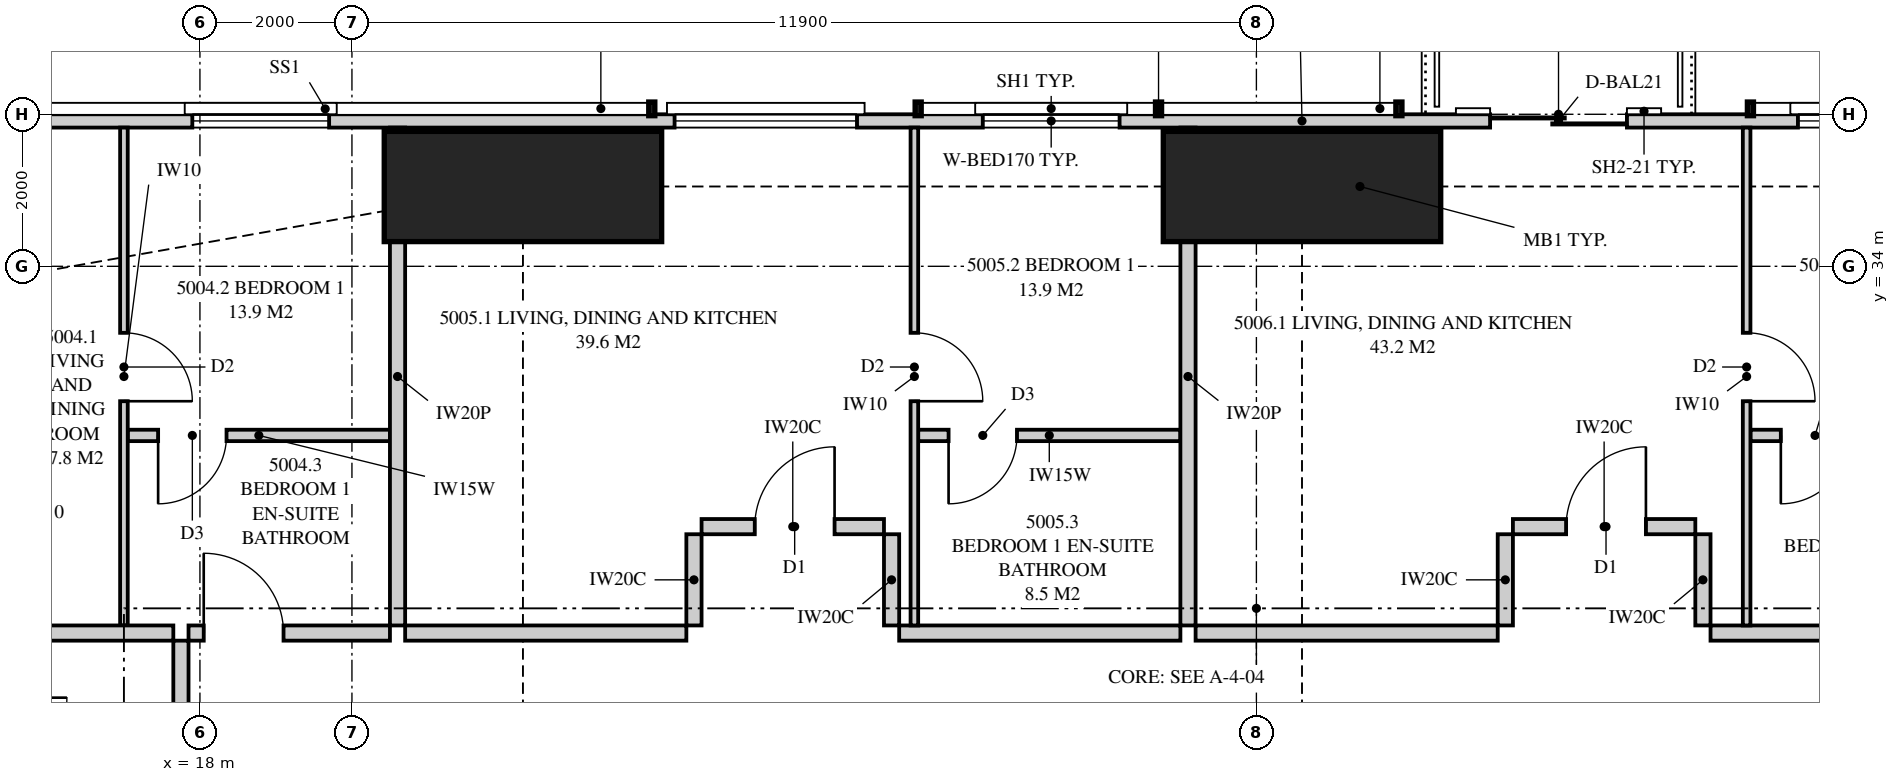
"""IFC4 building model, lengths in metres.
Left out: names, types, materials, properties, quantities, classifications, styles, units other than length and angle.
Written with IfcOpenShell. Run it as: python <this file> out.ifc"""

import sys

from ifc_helpers import new_model, si_unit, direction, frame, frame_2d, origin, origin_2d, place, context, subcontext, project, spatial, polyline, rectangle, outline, extrude, element, fill, save


model = new_model("IFC4")
c1 = context("Model", 3, precision=1e-05, world=origin(), true_north=direction((0.0, 1.0)))
c2 = subcontext(c1, "Body", "Model", "MODEL_VIEW")
j1 = project(units=[si_unit("LENGTHUNIT", "METRE"), si_unit("PLANEANGLEUNIT", "RADIAN")], contexts=[c1])
p1 = place(None, origin())
s1 = spatial("IfcSite", under=j1, at=p1, CompositionType="ELEMENT")
p2 = place(p1, origin())
s2 = spatial("IfcBuilding", under=s1, at=p2, CompositionType="ELEMENT")
p3 = place(p2, frame((0.0, 0.0, 184.5)))
s3 = spatial("IfcBuildingStorey", under=s2, at=p3, CompositionType="ELEMENT", Elevation=184.5)
for number, where, z_axis, x_axis in (
    (1, (32.5, 35.05, 0.0), (0.0, 0.0, 1.0), (0.0, 1.0, 0.0)),
    (2, (22.25, 35.05, 0.0), (0.0, 0.0, 1.0), (0.0, 1.0, 0.0)),
):
    element("IfcColumn", number, at=place(p3, frame(where, z_axis=z_axis, x_axis=x_axis)), inside=s3, PredefinedType="COLUMN", context=c2, shape_type="SweptSolid", body=[
        extrude(rectangle(XDim=1.45, YDim=3.65, at=origin_2d()), origin(), (0.0, 0.0, 1.0), 3.35),
    ])
p4 = place(p3, frame((49.949, 35.913, 0.0), z_axis=(0.0, 0.0, 1.0), x_axis=(-1.0, 0.0, 0.0)))
e3 = element("IfcWall", 3, at=p4, inside=s3, PredefinedType="SOLIDWALL", context=c2, shape_type="SweptSolid", body=[
    extrude(outline(polyline([(0.0, 0.0), (34.897, 0.0), (34.897, 3.11), (27.91, 3.11), (27.91, 2.15), (27.836, 2.15), (27.836, 3.11), (27.699, 3.11), (27.699, 2.15), (7.199, 2.15), (7.199, 3.11), (7.062, 3.11), (7.062, 2.15), (6.987, 2.15), (6.987, 3.11), (0.0, 3.11), (0.0, 0.0)])), frame((0.0, 0.087, 0.0), z_axis=(0.0, -1.0, 0.0), x_axis=(1.0, 0.0, 0.0)), (0.0, 0.0, 1.0), 0.175),
])
p5 = place(p4, frame((2.75, 0.0, 0.4)))
e4 = element("IfcOpeningElement", 4, at=p5, cuts=e3, PredefinedType="OPENING", context=c2, shape_type="SweptSolid", body=[
    extrude(rectangle(XDim=2.4, YDim=1.7, at=frame_2d((1.2, 0.85))), frame((0.0, 0.097, 0.0), z_axis=(0.0, -1.0, 0.0), x_axis=(1.0, 0.0, 0.0)), (0.0, 0.0, 1.0), 0.195),
])
p6 = place(p4, frame((9.124, 0.0, 0.4)))
e5 = element("IfcOpeningElement", 5, at=p6, cuts=e3, PredefinedType="OPENING", context=c2, shape_type="SweptSolid", body=[
    extrude(rectangle(XDim=1.8, YDim=1.7, at=frame_2d((0.9, 0.85))), frame((0.0, 0.097, 0.0), z_axis=(0.0, -1.0, 0.0), x_axis=(1.0, 0.0, 0.0)), (0.0, 0.0, 1.0), 0.195),
])
p7 = place(p4, frame((13.174, 0.0, 0.0)))
e6 = element("IfcOpeningElement", 6, at=p7, cuts=e3, PredefinedType="OPENING", context=c2, shape_type="SweptSolid", body=[
    extrude(rectangle(XDim=1.8, YDim=2.1, at=frame_2d((0.9, 1.05))), frame((0.0, 0.097, 0.0), z_axis=(0.0, -1.0, 0.0), x_axis=(1.0, 0.0, 0.0)), (0.0, 0.0, 1.0), 0.195),
])
p8 = place(p4, frame((19.849, 0.0, 0.4)))
e7 = element("IfcOpeningElement", 7, at=p8, cuts=e3, PredefinedType="OPENING", context=c2, shape_type="SweptSolid", body=[
    extrude(rectangle(XDim=1.8, YDim=1.7, at=frame_2d((0.9, 0.85))), frame((0.0, 0.097, 0.0), z_axis=(0.0, -1.0, 0.0), x_axis=(1.0, 0.0, 0.0)), (0.0, 0.0, 1.0), 0.195),
])
p9 = place(p4, frame((23.304, 0.0, 0.4)))
e8 = element("IfcOpeningElement", 8, at=p9, cuts=e3, PredefinedType="OPENING", context=c2, shape_type="SweptSolid", body=[
    extrude(rectangle(XDim=2.4, YDim=1.7, at=frame_2d((1.2, 0.85))), frame((0.0, 0.097, 0.0), z_axis=(0.0, -1.0, 0.0), x_axis=(1.0, 0.0, 0.0)), (0.0, 0.0, 1.0), 0.195),
])
p10 = place(p4, frame((30.249, 0.0, 0.4)))
e9 = element("IfcOpeningElement", 9, at=p10, cuts=e3, PredefinedType="OPENING", context=c2, shape_type="SweptSolid", body=[
    extrude(rectangle(XDim=1.8, YDim=1.7, at=frame_2d((0.9, 0.85))), frame((0.0, 0.097, 0.0), z_axis=(0.0, -1.0, 0.0), x_axis=(1.0, 0.0, 0.0)), (0.0, 0.0, 1.0), 0.195),
])
p11 = place(p3, frame((20.6, 35.825, 0.0), z_axis=(0.0, 0.0, 1.0), x_axis=(0.0, -1.0, 0.0)))
e10 = element("IfcWall", 10, at=p11, inside=s3, PredefinedType="PARTITIONING", context=c2, shape_type="SweptSolid", body=[
    extrude(outline(polyline([(0.0, 0.0), (6.55, 0.0), (6.55, 3.11), (1.991, 3.11), (1.991, 2.15), (0.143, 2.15), (0.143, 3.11), (0.0, 3.11), (0.0, 0.0)])), frame((0.0, 0.1, 0.0), z_axis=(0.0, -1.0, 0.0), x_axis=(1.0, 0.0, 0.0)), (0.0, 0.0, 1.0), 0.2),
])
p12 = place(p3, frame((17.85, 29.175, 0.0), z_axis=(0.0, 0.0, 1.0), x_axis=(1.0, 0.0, 0.0)))
e11 = element("IfcWall", 11, at=p12, inside=s3, PredefinedType="PARTITIONING", context=c2, shape_type="SweptSolid", body=[
    extrude(rectangle(XDim=2.65, YDim=0.2, at=frame_2d((1.325, 0.0))), origin(), (0.0, 0.0, 1.0), 3.11),
])
p13 = place(p12, frame((0.2, 0.0, 0.0)))
e12 = element("IfcOpeningElement", 12, at=p13, cuts=e11, PredefinedType="OPENING", context=c2, shape_type="SweptSolid", body=[
    extrude(rectangle(XDim=1.05, YDim=2.2, at=frame_2d((0.525, 1.1))), frame((0.0, 0.11, 0.0), z_axis=(0.0, -1.0, 0.0), x_axis=(1.0, 0.0, 0.0)), (0.0, 0.0, 1.0), 0.22),
])
p14 = place(p3, frame((17.0, 35.825, 0.0), z_axis=(0.0, 0.0, 1.0), x_axis=(0.0, -1.0, 0.0)))
e13 = element("IfcWall", 13, at=p14, inside=s3, PredefinedType="PARTITIONING", context=c2, shape_type="SweptSolid", body=[
    extrude(outline(polyline([(0.0, 0.0), (6.55, 0.0), (6.55, 3.11), (2.578, 3.11), (2.578, 2.15), (0.831, 2.15), (0.831, 3.11), (0.0, 3.11), (0.0, 0.0)])), frame((0.0, 0.05, 0.0), z_axis=(0.0, -1.0, 0.0), x_axis=(1.0, 0.0, 0.0)), (0.0, 0.0, 1.0), 0.1),
])
p15 = place(p14, frame((2.7, 0.0, 0.0)))
e14 = element("IfcOpeningElement", 14, at=p15, cuts=e13, PredefinedType="OPENING", context=c2, shape_type="SweptSolid", body=[
    extrude(rectangle(XDim=0.9, YDim=2.1, at=frame_2d((0.45, 1.05))), frame((0.0, 0.06, 0.0), z_axis=(0.0, -1.0, 0.0), x_axis=(1.0, 0.0, 0.0)), (0.0, 0.0, 1.0), 0.12),
])
p16 = place(p3, frame((17.05, 31.775, 0.0), z_axis=(0.0, 0.0, 1.0), x_axis=(1.0, 0.0, 0.0)))
e15 = element("IfcWall", 15, at=p16, inside=s3, PredefinedType="PLUMBINGWALL", context=c2, shape_type="SweptSolid", body=[
    extrude(rectangle(XDim=3.45, YDim=0.15, at=frame_2d((1.725, 0.0))), origin(), (0.0, 0.0, 1.0), 3.11),
])
p17 = place(p16, frame((0.4, 0.0, 0.0)))
e16 = element("IfcOpeningElement", 16, at=p17, cuts=e15, PredefinedType="OPENING", context=c2, shape_type="SweptSolid", body=[
    extrude(rectangle(XDim=0.9, YDim=2.1, at=frame_2d((0.45, 1.05))), frame((0.0, 0.085, 0.0), z_axis=(0.0, -1.0, 0.0), x_axis=(1.0, 0.0, 0.0)), (0.0, 0.0, 1.0), 0.17),
])
p18 = place(p3, frame((31.0, 35.825, 0.0), z_axis=(0.0, 0.0, 1.0), x_axis=(0.0, -1.0, 0.0)))
e17 = element("IfcWall", 17, at=p18, inside=s3, PredefinedType="PARTITIONING", context=c2, shape_type="SweptSolid", body=[
    extrude(outline(polyline([(0.0, 0.0), (6.55, 0.0), (6.55, 3.11), (1.685, 3.11), (1.685, 2.15), (0.0, 2.15), (0.0, 3.11), (0.0, 0.0)])), frame((0.0, 0.1, 0.0), z_axis=(0.0, -1.0, 0.0), x_axis=(1.0, 0.0, 0.0)), (0.0, 0.0, 1.0), 0.2),
])
p19 = place(p3, frame((20.7, 29.175, 0.0), z_axis=(0.0, 0.0, 1.0), x_axis=(1.0, 0.0, 0.0)))
e18 = element("IfcWall", 18, at=p19, inside=s3, PredefinedType="PARTITIONING", context=c2, shape_type="SweptSolid", body=[
    extrude(outline(polyline([(0.0, 0.0), (3.7, 0.0), (3.7, 3.11), (1.887, 3.11), (1.887, 2.541), (1.213, 2.541), (1.213, 3.11), (0.0, 3.11), (0.0, 0.0)])), frame((0.0, 0.1, 0.0), z_axis=(0.0, -1.0, 0.0), x_axis=(1.0, 0.0, 0.0)), (0.0, 0.0, 1.0), 0.2),
])
p20 = place(p3, frame((27.4, 35.825, 0.0), z_axis=(0.0, 0.0, 1.0), x_axis=(0.0, -1.0, 0.0)))
e19 = element("IfcWall", 19, at=p20, inside=s3, PredefinedType="PARTITIONING", context=c2, shape_type="SweptSolid", body=[
    extrude(outline(polyline([(0.0, 0.0), (6.55, 0.0), (6.55, 3.11), (1.635, 3.11), (1.635, 2.15), (0.0, 2.15), (0.0, 3.11), (0.0, 0.0)])), frame((0.0, 0.05, 0.0), z_axis=(0.0, -1.0, 0.0), x_axis=(1.0, 0.0, 0.0)), (0.0, 0.0, 1.0), 0.1),
])
p21 = place(p20, frame((2.7, 0.0, 0.0)))
e20 = element("IfcOpeningElement", 20, at=p21, cuts=e19, PredefinedType="OPENING", context=c2, shape_type="SweptSolid", body=[
    extrude(rectangle(XDim=0.9, YDim=2.1, at=frame_2d((0.45, 1.05))), frame((0.0, 0.06, 0.0), z_axis=(0.0, -1.0, 0.0), x_axis=(1.0, 0.0, 0.0)), (0.0, 0.0, 1.0), 0.12),
])
p22 = place(p3, frame((27.45, 31.775, 0.0), z_axis=(0.0, 0.0, 1.0), x_axis=(1.0, 0.0, 0.0)))
e21 = element("IfcWall", 21, at=p22, inside=s3, PredefinedType="PLUMBINGWALL", context=c2, shape_type="SweptSolid", body=[
    extrude(rectangle(XDim=3.45, YDim=0.15, at=frame_2d((1.725, 0.0))), origin(), (0.0, 0.0, 1.0), 3.11),
])
p23 = place(p22, frame((0.4, 0.0, 0.0)))
e22 = element("IfcOpeningElement", 22, at=p23, cuts=e21, PredefinedType="OPENING", context=c2, shape_type="SweptSolid", body=[
    extrude(rectangle(XDim=0.9, YDim=2.1, at=frame_2d((0.45, 1.05))), frame((0.0, 0.085, 0.0), z_axis=(0.0, -1.0, 0.0), x_axis=(1.0, 0.0, 0.0)), (0.0, 0.0, 1.0), 0.17),
])
p24 = place(p3, frame((31.1, 29.175, 0.0), z_axis=(0.0, 0.0, 1.0), x_axis=(1.0, 0.0, 0.0)))
e23 = element("IfcWall", 23, at=p24, inside=s3, PredefinedType="PARTITIONING", context=c2, shape_type="SweptSolid", body=[
    extrude(outline(polyline([(0.0, 0.0), (3.975, 0.0), (3.975, 3.11), (1.737, 3.11), (1.737, 2.541), (1.062, 2.541), (1.062, 3.11), (0.0, 3.11), (0.0, 0.0)])), frame((0.0, 0.1, 0.0), z_axis=(0.0, -1.0, 0.0), x_axis=(1.0, 0.0, 0.0)), (0.0, 0.0, 1.0), 0.2),
])
p25 = place(p3, frame((38.35, 35.825, 0.0), z_axis=(0.0, 0.0, 1.0), x_axis=(0.0, -1.0, 0.0)))
e24 = element("IfcWall", 24, at=p25, inside=s3, PredefinedType="PARTITIONING", context=c2, shape_type="SweptSolid", body=[
    extrude(outline(polyline([(0.0, 0.0), (6.55, 0.0), (6.55, 3.11), (1.635, 3.11), (1.635, 2.15), (0.0, 2.15), (0.0, 3.11), (0.0, 0.0)])), frame((0.0, 0.05, 0.0), z_axis=(0.0, -1.0, 0.0), x_axis=(1.0, 0.0, 0.0)), (0.0, 0.0, 1.0), 0.1),
])
p26 = place(p25, frame((2.7, 0.0, 0.0)))
e25 = element("IfcOpeningElement", 25, at=p26, cuts=e24, PredefinedType="OPENING", context=c2, shape_type="SweptSolid", body=[
    extrude(rectangle(XDim=0.9, YDim=2.1, at=frame_2d((0.45, 1.05))), frame((0.0, 0.06, 0.0), z_axis=(0.0, -1.0, 0.0), x_axis=(1.0, 0.0, 0.0)), (0.0, 0.0, 1.0), 0.12),
])
p27 = place(p3, frame((38.4, 31.775, 0.0), z_axis=(0.0, 0.0, 1.0), x_axis=(1.0, 0.0, 0.0)))
e26 = element("IfcWall", 26, at=p27, inside=s3, PredefinedType="PLUMBINGWALL", context=c2, shape_type="SweptSolid", body=[
    extrude(rectangle(XDim=3.45, YDim=0.15, at=frame_2d((1.725, 0.0))), origin(), (0.0, 0.0, 1.0), 3.11),
])
p28 = place(p27, frame((0.4, 0.0, 0.0)))
e27 = element("IfcOpeningElement", 27, at=p28, cuts=e26, PredefinedType="OPENING", context=c2, shape_type="SweptSolid", body=[
    extrude(rectangle(XDim=0.9, YDim=2.1, at=frame_2d((0.45, 1.05))), frame((0.0, 0.085, 0.0), z_axis=(0.0, -1.0, 0.0), x_axis=(1.0, 0.0, 0.0)), (0.0, 0.0, 1.0), 0.17),
])
p29 = place(p3, frame((12.0, 29.175, 0.0), z_axis=(0.0, 0.0, 1.0), x_axis=(1.0, 0.0, 0.0)))
e28 = element("IfcWall", 28, at=p29, inside=s3, PredefinedType="PARTITIONING", context=c2, shape_type="SweptSolid", body=[
    extrude(outline(polyline([(0.0, 0.0), (5.65, 0.0), (5.65, 3.11), (2.547, 3.11), (2.547, 2.15), (0.703, 2.15), (0.703, 3.11), (0.0, 3.11), (0.0, 0.0)])), frame((0.0, 0.1, 0.0), z_axis=(0.0, -1.0, 0.0), x_axis=(1.0, 0.0, 0.0)), (0.0, 0.0, 1.0), 0.2),
])
p30 = place(p3, frame((17.75, 7.925, 0.0), z_axis=(0.0, 0.0, 1.0), x_axis=(0.0, 1.0, 0.0)))
e29 = element("IfcWall", 29, at=p30, inside=s3, PredefinedType="PARTITIONING", context=c2, shape_type="SweptSolid", body=[
    extrude(outline(polyline([(0.0, 0.0), (21.15, 0.0), (21.15, 3.11), (17.412, 3.11), (17.412, 2.541), (16.738, 2.541), (16.738, 3.11), (5.412, 3.11), (5.412, 2.541), (4.738, 2.541), (4.738, 3.11), (0.0, 3.11), (0.0, 0.0)])), frame((0.0, 0.1, 0.0), z_axis=(0.0, -1.0, 0.0), x_axis=(1.0, 0.0, 0.0)), (0.0, 0.0, 1.0), 0.2),
])
p31 = place(p30, frame((16.25, 0.0, 0.0)))
e30 = element("IfcOpeningElement", 30, at=p31, cuts=e29, PredefinedType="OPENING", context=c2, shape_type="SweptSolid", body=[
    extrude(rectangle(XDim=1.05, YDim=2.2, at=frame_2d((0.525, 1.1))), frame((0.0, 0.11, 0.0), z_axis=(0.0, -1.0, 0.0), x_axis=(1.0, 0.0, 0.0)), (0.0, 0.0, 1.0), 0.22),
])
p32 = place(p3, frame((27.2, 29.175, 0.0), z_axis=(0.0, 0.0, 1.0), x_axis=(1.0, 0.0, 0.0)))
e31 = element("IfcWall", 31, at=p32, inside=s3, PredefinedType="PARTITIONING", context=c2, shape_type="SweptSolid", body=[
    extrude(rectangle(XDim=3.7, YDim=0.2, at=frame_2d((1.85, 0.0))), origin(), (0.0, 0.0, 1.0), 3.11),
])
p33 = place(p3, frame((24.6, 30.575, 0.0), z_axis=(0.0, 0.0, 1.0), x_axis=(1.0, 0.0, 0.0)))
e32 = element("IfcWall", 32, at=p33, inside=s3, PredefinedType="PARTITIONING", context=c2, shape_type="SweptSolid", body=[
    extrude(rectangle(XDim=2.4, YDim=0.2, at=frame_2d((1.2, 0.0))), origin(), (0.0, 0.0, 1.0), 3.11),
])
p34 = place(p33, frame((0.7, 0.0, 0.0)))
e33 = element("IfcOpeningElement", 33, at=p34, cuts=e32, PredefinedType="OPENING", context=c2, shape_type="SweptSolid", body=[
    extrude(rectangle(XDim=1.05, YDim=2.2, at=frame_2d((0.525, 1.1))), frame((0.0, 0.11, 0.0), z_axis=(0.0, -1.0, 0.0), x_axis=(1.0, 0.0, 0.0)), (0.0, 0.0, 1.0), 0.22),
])
for number, where, z_axis, x_axis in (
    (34, (24.5, 29.275, 0.0), (0.0, 0.0, 1.0), (0.0, 1.0, 0.0)),
    (35, (27.1, 29.275, 0.0), (0.0, 0.0, 1.0), (0.0, 1.0, 0.0)),
):
    element("IfcWall", number, at=place(p3, frame(where, z_axis=z_axis, x_axis=x_axis)), inside=s3, PredefinedType="PARTITIONING", context=c2, shape_type="SweptSolid", body=[
        extrude(rectangle(XDim=1.2, YDim=0.2, at=frame_2d((0.6, 0.0))), origin(), (0.0, 0.0, 1.0), 3.11),
    ])
p35 = place(p3, frame((37.875, 29.175, 0.0), z_axis=(0.0, 0.0, 1.0), x_axis=(1.0, 0.0, 0.0)))
e36 = element("IfcWall", 36, at=p35, inside=s3, PredefinedType="PARTITIONING", context=c2, shape_type="SweptSolid", body=[
    extrude(rectangle(XDim=3.975, YDim=0.2, at=frame_2d((1.988, 0.0))), origin(), (0.0, 0.0, 1.0), 3.11),
])
p36 = place(p3, frame((35.275, 30.575, 0.0), z_axis=(0.0, 0.0, 1.0), x_axis=(1.0, 0.0, 0.0)))
e37 = element("IfcWall", 37, at=p36, inside=s3, PredefinedType="PARTITIONING", context=c2, shape_type="SweptSolid", body=[
    extrude(rectangle(XDim=2.4, YDim=0.2, at=frame_2d((1.2, 0.0))), origin(), (0.0, 0.0, 1.0), 3.11),
])
p37 = place(p36, frame((0.7, 0.0, 0.0)))
e38 = element("IfcOpeningElement", 38, at=p37, cuts=e37, PredefinedType="OPENING", context=c2, shape_type="SweptSolid", body=[
    extrude(rectangle(XDim=1.05, YDim=2.2, at=frame_2d((0.525, 1.1))), frame((0.0, 0.11, 0.0), z_axis=(0.0, -1.0, 0.0), x_axis=(1.0, 0.0, 0.0)), (0.0, 0.0, 1.0), 0.22),
])
for number, where, z_axis, x_axis in (
    (39, (35.175, 29.275, 0.0), (0.0, 0.0, 1.0), (0.0, 1.0, 0.0)),
    (40, (37.775, 29.275, 0.0), (0.0, 0.0, 1.0), (0.0, 1.0, 0.0)),
):
    element("IfcWall", number, at=place(p3, frame(where, z_axis=z_axis, x_axis=x_axis)), inside=s3, PredefinedType="PARTITIONING", context=c2, shape_type="SweptSolid", body=[
        extrude(rectangle(XDim=1.2, YDim=0.2, at=frame_2d((0.6, 0.0))), origin(), (0.0, 0.0, 1.0), 3.11),
    ])
p38 = place(p6, origin())
e41 = element("IfcWindow", 41, at=p38, inside=s3, PartitioningType="SINGLE_PANEL", PredefinedType="WINDOW", context=c2, shape_type="SweptSolid", body=[
    extrude(rectangle(XDim=1.8, YDim=1.7, at=frame_2d((0.9, 0.85))), frame((0.0, 0.03, 0.0), z_axis=(0.0, -1.0, 0.0), x_axis=(1.0, 0.0, 0.0)), (0.0, 0.0, 1.0), 0.06),
])
fill(e5, e41)
p39 = place(p7, origin())
e42 = element("IfcDoor", 42, at=p39, inside=s3, OperationType="SLIDING_TO_LEFT", PredefinedType="DOOR", context=c2, shape_type="SweptSolid", body=[
    extrude(rectangle(XDim=1.8, YDim=2.1, at=frame_2d((0.9, 1.05))), frame((0.0, 0.025, 0.0), z_axis=(0.0, -1.0, 0.0), x_axis=(1.0, 0.0, 0.0)), (0.0, 0.0, 1.0), 0.05),
])
fill(e6, e42)
p40 = place(p8, origin())
e43 = element("IfcWindow", 43, at=p40, inside=s3, PartitioningType="SINGLE_PANEL", PredefinedType="WINDOW", context=c2, shape_type="SweptSolid", body=[
    extrude(rectangle(XDim=1.8, YDim=1.7, at=frame_2d((0.9, 0.85))), frame((0.0, 0.03, 0.0), z_axis=(0.0, -1.0, 0.0), x_axis=(1.0, 0.0, 0.0)), (0.0, 0.0, 1.0), 0.06),
])
fill(e7, e43)
p41 = place(p9, origin())
e44 = element("IfcWindow", 44, at=p41, inside=s3, PartitioningType="SINGLE_PANEL", PredefinedType="WINDOW", context=c2, shape_type="SweptSolid", body=[
    extrude(rectangle(XDim=2.4, YDim=1.7, at=frame_2d((1.2, 0.85))), frame((0.0, 0.03, 0.0), z_axis=(0.0, -1.0, 0.0), x_axis=(1.0, 0.0, 0.0)), (0.0, 0.0, 1.0), 0.06),
])
fill(e8, e44)
p42 = place(p10, origin())
e45 = element("IfcWindow", 45, at=p42, inside=s3, PartitioningType="SINGLE_PANEL", PredefinedType="WINDOW", context=c2, shape_type="SweptSolid", body=[
    extrude(rectangle(XDim=1.8, YDim=1.7, at=frame_2d((0.9, 0.85))), frame((0.0, 0.03, 0.0), z_axis=(0.0, -1.0, 0.0), x_axis=(1.0, 0.0, 0.0)), (0.0, 0.0, 1.0), 0.06),
])
fill(e9, e45)
p43 = place(p13, origin())
e46 = element("IfcDoor", 46, at=p43, inside=s3, OperationType="SINGLE_SWING_LEFT", PredefinedType="DOOR", context=c2, shape_type="SweptSolid", body=[
    extrude(rectangle(XDim=1.05, YDim=2.2, at=frame_2d((0.525, 1.1))), frame((0.0, 0.025, 0.0), z_axis=(0.0, -1.0, 0.0), x_axis=(1.0, 0.0, 0.0)), (0.0, 0.0, 1.0), 0.05),
])
fill(e12, e46)
p44 = place(p15, origin())
e47 = element("IfcDoor", 47, at=p44, inside=s3, OperationType="SINGLE_SWING_RIGHT", PredefinedType="DOOR", context=c2, shape_type="SweptSolid", body=[
    extrude(rectangle(XDim=0.9, YDim=2.1, at=frame_2d((0.45, 1.05))), frame((0.0, 0.025, 0.0), z_axis=(0.0, -1.0, 0.0), x_axis=(1.0, 0.0, 0.0)), (0.0, 0.0, 1.0), 0.05),
])
fill(e14, e47)
p45 = place(p17, frame((0.9, 0.0, 0.0), z_axis=(0.0, 0.0, 1.0), x_axis=(-1.0, 0.0, 0.0)))
e48 = element("IfcDoor", 48, at=p45, inside=s3, OperationType="SINGLE_SWING_RIGHT", PredefinedType="DOOR", context=c2, shape_type="SweptSolid", body=[
    extrude(rectangle(XDim=0.9, YDim=2.1, at=frame_2d((0.45, 1.05))), frame((0.0, 0.025, 0.0), z_axis=(0.0, -1.0, 0.0), x_axis=(1.0, 0.0, 0.0)), (0.0, 0.0, 1.0), 0.05),
])
fill(e16, e48)
p46 = place(p34, origin())
e49 = element("IfcDoor", 49, at=p46, inside=s3, OperationType="SINGLE_SWING_RIGHT", PredefinedType="DOOR", context=c2, shape_type="SweptSolid", body=[
    extrude(rectangle(XDim=1.05, YDim=2.2, at=frame_2d((0.525, 1.1))), frame((0.0, 0.025, 0.0), z_axis=(0.0, -1.0, 0.0), x_axis=(1.0, 0.0, 0.0)), (0.0, 0.0, 1.0), 0.05),
])
fill(e33, e49)
p47 = place(p21, origin())
e50 = element("IfcDoor", 50, at=p47, inside=s3, OperationType="SINGLE_SWING_RIGHT", PredefinedType="DOOR", context=c2, shape_type="SweptSolid", body=[
    extrude(rectangle(XDim=0.9, YDim=2.1, at=frame_2d((0.45, 1.05))), frame((0.0, 0.025, 0.0), z_axis=(0.0, -1.0, 0.0), x_axis=(1.0, 0.0, 0.0)), (0.0, 0.0, 1.0), 0.05),
])
fill(e20, e50)
p48 = place(p23, frame((0.9, 0.0, 0.0), z_axis=(0.0, 0.0, 1.0), x_axis=(-1.0, 0.0, 0.0)))
e51 = element("IfcDoor", 51, at=p48, inside=s3, OperationType="SINGLE_SWING_RIGHT", PredefinedType="DOOR", context=c2, shape_type="SweptSolid", body=[
    extrude(rectangle(XDim=0.9, YDim=2.1, at=frame_2d((0.45, 1.05))), frame((0.0, 0.025, 0.0), z_axis=(0.0, -1.0, 0.0), x_axis=(1.0, 0.0, 0.0)), (0.0, 0.0, 1.0), 0.05),
])
fill(e22, e51)
p49 = place(p37, origin())
e52 = element("IfcDoor", 52, at=p49, inside=s3, OperationType="SINGLE_SWING_RIGHT", PredefinedType="DOOR", context=c2, shape_type="SweptSolid", body=[
    extrude(rectangle(XDim=1.05, YDim=2.2, at=frame_2d((0.525, 1.1))), frame((0.0, 0.025, 0.0), z_axis=(0.0, -1.0, 0.0), x_axis=(1.0, 0.0, 0.0)), (0.0, 0.0, 1.0), 0.05),
])
fill(e38, e52)
p50 = place(p26, origin())
e53 = element("IfcDoor", 53, at=p50, inside=s3, OperationType="SINGLE_SWING_RIGHT", PredefinedType="DOOR", context=c2, shape_type="SweptSolid", body=[
    extrude(rectangle(XDim=0.9, YDim=2.1, at=frame_2d((0.45, 1.05))), frame((0.0, 0.025, 0.0), z_axis=(0.0, -1.0, 0.0), x_axis=(1.0, 0.0, 0.0)), (0.0, 0.0, 1.0), 0.05),
])
fill(e25, e53)
p51 = place(p28, frame((0.9, 0.0, 0.0), z_axis=(0.0, 0.0, 1.0), x_axis=(-1.0, 0.0, 0.0)))
e54 = element("IfcDoor", 54, at=p51, inside=s3, OperationType="SINGLE_SWING_RIGHT", PredefinedType="DOOR", context=c2, shape_type="SweptSolid", body=[
    extrude(rectangle(XDim=0.9, YDim=2.1, at=frame_2d((0.45, 1.05))), frame((0.0, 0.025, 0.0), z_axis=(0.0, -1.0, 0.0), x_axis=(1.0, 0.0, 0.0)), (0.0, 0.0, 1.0), 0.05),
])
fill(e27, e54)
save(model, sys.argv[1])
